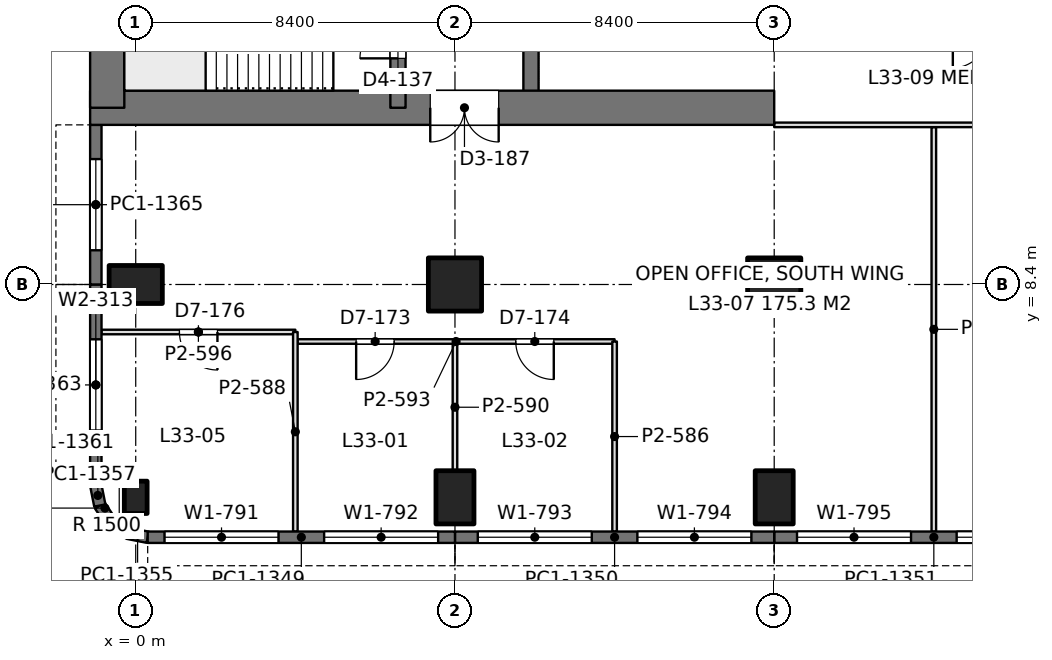
"""IFC4 building model, lengths in metres.
Left out: names, types, materials, properties, quantities, classifications, styles, units other than length and angle.
Written with IfcOpenShell. Run it as: python <this file> out.ifc"""

import sys

from ifc_helpers import new_model, si_unit, direction, frame, frame_2d, origin, origin_2d, place, context, subcontext, project, spatial, rectangle, extrude, element, fill, save


model = new_model("IFC4")
c1 = context("Model", 3, precision=1e-05, world=origin(), true_north=direction((0.0, 1.0)))
c2 = subcontext(c1, "Body", "Model", "MODEL_VIEW")
j1 = project(units=[si_unit("LENGTHUNIT", "METRE"), si_unit("PLANEANGLEUNIT", "RADIAN")], contexts=[c1])
p1 = place(None, origin())
s1 = spatial("IfcSite", under=j1, at=p1, CompositionType="ELEMENT")
p2 = place(p1, origin())
s2 = spatial("IfcBuilding", under=s1, at=p2, CompositionType="ELEMENT")
p3 = place(p2, frame((0.0, 0.0, 147.0)))
s3 = spatial("IfcBuildingStorey", under=s2, at=p3, CompositionType="ELEMENT", Elevation=147.0)
p4 = place(p3, frame((0.0, 2.8, 0.0), z_axis=(0.0, 0.0, 1.0), x_axis=(1.0, 0.0, 0.0)))
e1 = element("IfcColumn", 1, at=p4, inside=s3, PredefinedType="COLUMN", context=c2, shape_type="SweptSolid", body=[
    extrude(rectangle(XDim=0.6, YDim=0.85, at=origin_2d()), origin(), (0.0, 0.0, 1.0), 4.2),
])
for number, where, z_axis, x_axis in (
    (2, (0.0, 8.4, 0.0), (0.0, 0.0, 1.0), (0.0, 1.0, 0.0)),
    (3, (8.4, 2.8, 0.0), (0.0, 0.0, 1.0), (1.0, 0.0, 0.0)),
):
    element("IfcColumn", number, at=place(p3, frame(where, z_axis=z_axis, x_axis=x_axis)), inside=s3, PredefinedType="COLUMN", context=c2, shape_type="SweptSolid", body=[
        extrude(rectangle(XDim=1.0, YDim=1.4, at=origin_2d()), origin(), (0.0, 0.0, 1.0), 4.2),
    ])
p5 = place(p3, frame((8.4, 8.4, 0.0), z_axis=(0.0, 0.0, 1.0), x_axis=(1.0, 0.0, 0.0)))
e4 = element("IfcColumn", 4, at=p5, inside=s3, PredefinedType="COLUMN", context=c2, shape_type="SweptSolid", body=[
    extrude(rectangle(XDim=1.4, YDim=1.4, at=origin_2d()), origin(), (0.0, 0.0, 1.0), 4.2),
])
p6 = place(p3, frame((16.8, 2.8, 0.0), z_axis=(0.0, 0.0, 1.0), x_axis=(1.0, 0.0, 0.0)))
e5 = element("IfcColumn", 5, at=p6, inside=s3, PredefinedType="COLUMN", context=c2, shape_type="SweptSolid", body=[
    extrude(rectangle(XDim=1.0, YDim=1.4, at=origin_2d()), origin(), (0.0, 0.0, 1.0), 4.2),
])
p7 = place(p3, frame((16.8, 8.4, 0.0), z_axis=(0.0, 0.0, 1.0), x_axis=(1.0, 0.0, 0.0)))
e6 = element("IfcColumn", 6, at=p7, inside=s3, PredefinedType="COLUMN", context=c2, shape_type="SweptSolid", body=[
    extrude(rectangle(XDim=1.4, YDim=1.4, at=origin_2d()), origin(), (0.0, 0.0, 1.0), 4.2),
])
p8 = place(p3, frame((-1.2, 13.05, 0.0), z_axis=(0.0, 0.0, 1.0), x_axis=(1.0, 0.0, 0.0)))
e7 = element("IfcWall", 7, at=p8, inside=s3, PredefinedType="SHEAR", context=c2, shape_type="SweptSolid", body=[
    extrude(rectangle(XDim=18.0, YDim=0.9, at=frame_2d((9.0, 0.0))), origin(), (0.0, 0.0, 1.0), 4.2),
])
p9 = place(p8, frame((8.95, 0.0, 0.0)))
e8 = element("IfcOpeningElement", 8, at=p9, cuts=e7, PredefinedType="OPENING", context=c2, shape_type="SweptSolid", body=[
    extrude(rectangle(XDim=1.8, YDim=2.4, at=frame_2d((0.9, 1.2))), frame((0.0, 0.46, 0.0), z_axis=(0.0, -1.0, 0.0), x_axis=(1.0, 0.0, 0.0)), (0.0, 0.0, 1.0), 0.92),
])
p10 = place(p3, frame((-0.75, 13.05, 0.0), z_axis=(0.0, 0.0, 1.0), x_axis=(0.0, 1.0, 0.0)))
e9 = element("IfcWall", 9, at=p10, inside=s3, PredefinedType="SHEAR", context=c2, shape_type="SweptSolid", body=[
    extrude(rectangle(XDim=24.3, YDim=0.9, at=frame_2d((12.15, 0.0))), origin(), (0.0, 0.0, 1.0), 4.2),
])
p11 = place(p3, frame((6.9, 13.05, 0.0), z_axis=(0.0, 0.0, 1.0), x_axis=(0.0, 1.0, 0.0)))
e10 = element("IfcWall", 10, at=p11, inside=s3, PredefinedType="SHEAR", context=c2, shape_type="SweptSolid", body=[
    extrude(rectangle(XDim=24.3, YDim=0.4, at=frame_2d((12.15, 0.0))), origin(), (0.0, 0.0, 1.0), 4.2),
])
p12 = place(p11, frame((1.3, 0.0, 0.0)))
e11 = element("IfcOpeningElement", 11, at=p12, cuts=e10, PredefinedType="OPENING", context=c2, shape_type="SweptSolid", body=[
    extrude(rectangle(XDim=1.0, YDim=2.2, at=frame_2d((0.5, 1.1))), frame((0.0, 0.21, 0.0), z_axis=(0.0, -1.0, 0.0), x_axis=(1.0, 0.0, 0.0)), (0.0, 0.0, 1.0), 0.42),
])
p13 = place(p11, frame((22.0, 0.0, 0.0)))
e12 = element("IfcOpeningElement", 12, at=p13, cuts=e10, PredefinedType="OPENING", context=c2, shape_type="SweptSolid", body=[
    extrude(rectangle(XDim=1.0, YDim=2.2, at=frame_2d((0.5, 1.1))), frame((0.0, 0.21, 0.0), z_axis=(0.0, -1.0, 0.0), x_axis=(1.0, 0.0, 0.0)), (0.0, 0.0, 1.0), 0.42),
])
p14 = place(p11, frame((5.55, 0.0, 0.0)))
e13 = element("IfcOpeningElement", 13, at=p14, cuts=e10, PredefinedType="OPENING", context=c2, shape_type="SweptSolid", body=[
    extrude(rectangle(XDim=1.0, YDim=2.2, at=frame_2d((0.5, 1.1))), frame((0.0, 0.21, 0.0), z_axis=(0.0, -1.0, 0.0), x_axis=(1.0, 0.0, 0.0)), (0.0, 0.0, 1.0), 0.42),
])
p15 = place(p11, frame((9.55, 0.0, 0.0)))
e14 = element("IfcOpeningElement", 14, at=p15, cuts=e10, PredefinedType="OPENING", context=c2, shape_type="SweptSolid", body=[
    extrude(rectangle(XDim=1.0, YDim=2.2, at=frame_2d((0.5, 1.1))), frame((0.0, 0.21, 0.0), z_axis=(0.0, -1.0, 0.0), x_axis=(1.0, 0.0, 0.0)), (0.0, 0.0, 1.0), 0.42),
])
p16 = place(p11, frame((12.8, 0.0, 0.0)))
e15 = element("IfcOpeningElement", 15, at=p16, cuts=e10, PredefinedType="OPENING", context=c2, shape_type="SweptSolid", body=[
    extrude(rectangle(XDim=1.1, YDim=2.2, at=frame_2d((0.55, 1.1))), frame((0.0, 0.21, 0.0), z_axis=(0.0, -1.0, 0.0), x_axis=(1.0, 0.0, 0.0)), (0.0, 0.0, 1.0), 0.42),
])
p17 = place(p11, frame((15.538, 0.0, 0.0)))
e16 = element("IfcOpeningElement", 16, at=p17, cuts=e10, PredefinedType="OPENING", context=c2, shape_type="SweptSolid", body=[
    extrude(rectangle(XDim=1.1, YDim=2.2, at=frame_2d((0.55, 1.1))), frame((0.0, 0.21, 0.0), z_axis=(0.0, -1.0, 0.0), x_axis=(1.0, 0.0, 0.0)), (0.0, 0.0, 1.0), 0.42),
])
p18 = place(p11, frame((18.262, 0.0, 0.0)))
e17 = element("IfcOpeningElement", 17, at=p18, cuts=e10, PredefinedType="OPENING", context=c2, shape_type="SweptSolid", body=[
    extrude(rectangle(XDim=1.1, YDim=2.2, at=frame_2d((0.55, 1.1))), frame((0.0, 0.21, 0.0), z_axis=(0.0, -1.0, 0.0), x_axis=(1.0, 0.0, 0.0)), (0.0, 0.0, 1.0), 0.42),
])
p19 = place(p3, frame((10.4, 13.05, 0.0), z_axis=(0.0, 0.0, 1.0), x_axis=(0.0, 1.0, 0.0)))
e18 = element("IfcWall", 18, at=p19, inside=s3, PredefinedType="SHEAR", context=c2, shape_type="SweptSolid", body=[
    extrude(rectangle(XDim=24.3, YDim=0.4, at=frame_2d((12.15, 0.0))), origin(), (0.0, 0.0, 1.0), 4.2),
])
p20 = place(p19, frame((10.05, 0.0, 0.0)))
e19 = element("IfcOpeningElement", 19, at=p20, cuts=e18, PredefinedType="OPENING", context=c2, shape_type="SweptSolid", body=[
    extrude(rectangle(XDim=1.1, YDim=2.2, at=frame_2d((0.55, 1.1))), frame((0.0, 0.21, 0.0), z_axis=(0.0, -1.0, 0.0), x_axis=(1.0, 0.0, 0.0)), (0.0, 0.0, 1.0), 0.42),
])
p21 = place(p19, frame((12.9, 0.0, 0.0)))
e20 = element("IfcOpeningElement", 20, at=p21, cuts=e18, PredefinedType="OPENING", context=c2, shape_type="SweptSolid", body=[
    extrude(rectangle(XDim=1.1, YDim=2.2, at=frame_2d((0.55, 1.1))), frame((0.0, 0.21, 0.0), z_axis=(0.0, -1.0, 0.0), x_axis=(1.0, 0.0, 0.0)), (0.0, 0.0, 1.0), 0.42),
])
p22 = place(p19, frame((21.45, 0.0, 0.0)))
e21 = element("IfcOpeningElement", 21, at=p22, cuts=e18, PredefinedType="OPENING", context=c2, shape_type="SweptSolid", body=[
    extrude(rectangle(XDim=1.1, YDim=2.2, at=frame_2d((0.55, 1.1))), frame((0.0, 0.21, 0.0), z_axis=(0.0, -1.0, 0.0), x_axis=(1.0, 0.0, 0.0)), (0.0, 0.0, 1.0), 0.42),
])
p23 = place(p19, frame((2.25, 0.0, 0.0)))
e22 = element("IfcOpeningElement", 22, at=p23, cuts=e18, PredefinedType="OPENING", context=c2, shape_type="SweptSolid", body=[
    extrude(rectangle(XDim=1.8, YDim=2.4, at=frame_2d((0.9, 1.2))), frame((0.0, 0.21, 0.0), z_axis=(0.0, -1.0, 0.0), x_axis=(1.0, 0.0, 0.0)), (0.0, 0.0, 1.0), 0.42),
])
p24 = place(p19, frame((5.8, 0.0, 0.0)))
e23 = element("IfcOpeningElement", 23, at=p24, cuts=e18, PredefinedType="OPENING", context=c2, shape_type="SweptSolid", body=[
    extrude(rectangle(XDim=1.8, YDim=2.4, at=frame_2d((0.9, 1.2))), frame((0.0, 0.21, 0.0), z_axis=(0.0, -1.0, 0.0), x_axis=(1.0, 0.0, 0.0)), (0.0, 0.0, 1.0), 0.42),
])
p25 = place(p3, frame((25.2, 1.75, 0.0), z_axis=(0.0, 0.0, 1.0), x_axis=(-1.0, 0.0, 0.0)))
e24 = element("IfcWall", 24, at=p25, inside=s3, PredefinedType="SOLIDWALL", context=c2, shape_type="SweptSolid", body=[
    extrude(rectangle(XDim=8.4, YDim=0.3, at=frame_2d((4.2, 0.0))), origin(), (0.0, 0.0, 1.0), 4.05),
])
p26 = place(p25, frame((0.6, 0.0, 0.9)))
e25 = element("IfcOpeningElement", 25, at=p26, cuts=e24, PredefinedType="OPENING", context=c2, shape_type="SweptSolid", body=[
    extrude(rectangle(XDim=3.0, YDim=1.9, at=frame_2d((1.5, 0.95))), frame((0.0, 0.16, 0.0), z_axis=(0.0, -1.0, 0.0), x_axis=(1.0, 0.0, 0.0)), (0.0, 0.0, 1.0), 0.32),
])
p27 = place(p25, frame((4.8, 0.0, 0.9)))
e26 = element("IfcOpeningElement", 26, at=p27, cuts=e24, PredefinedType="OPENING", context=c2, shape_type="SweptSolid", body=[
    extrude(rectangle(XDim=3.0, YDim=1.9, at=frame_2d((1.5, 0.95))), frame((0.0, 0.16, 0.0), z_axis=(0.0, -1.0, 0.0), x_axis=(1.0, 0.0, 0.0)), (0.0, 0.0, 1.0), 0.32),
])
p28 = place(p3, frame((16.8, 1.75, 0.0), z_axis=(0.0, 0.0, 1.0), x_axis=(-1.0, 0.0, 0.0)))
e27 = element("IfcWall", 27, at=p28, inside=s3, PredefinedType="SOLIDWALL", context=c2, shape_type="SweptSolid", body=[
    extrude(rectangle(XDim=8.4, YDim=0.3, at=frame_2d((4.2, 0.0))), origin(), (0.0, 0.0, 1.0), 4.05),
])
p29 = place(p28, frame((0.6, 0.0, 0.9)))
e28 = element("IfcOpeningElement", 28, at=p29, cuts=e27, PredefinedType="OPENING", context=c2, shape_type="SweptSolid", body=[
    extrude(rectangle(XDim=3.0, YDim=1.9, at=frame_2d((1.5, 0.95))), frame((0.0, 0.16, 0.0), z_axis=(0.0, -1.0, 0.0), x_axis=(1.0, 0.0, 0.0)), (0.0, 0.0, 1.0), 0.32),
])
p30 = place(p28, frame((4.8, 0.0, 0.9)))
e29 = element("IfcOpeningElement", 29, at=p30, cuts=e27, PredefinedType="OPENING", context=c2, shape_type="SweptSolid", body=[
    extrude(rectangle(XDim=3.0, YDim=1.9, at=frame_2d((1.5, 0.95))), frame((0.0, 0.16, 0.0), z_axis=(0.0, -1.0, 0.0), x_axis=(1.0, 0.0, 0.0)), (0.0, 0.0, 1.0), 0.32),
])
p31 = place(p3, frame((8.4, 1.75, 0.0), z_axis=(0.0, 0.0, 1.0), x_axis=(-1.0, 0.0, 0.0)))
e30 = element("IfcWall", 30, at=p31, inside=s3, PredefinedType="SOLIDWALL", context=c2, shape_type="SweptSolid", body=[
    extrude(rectangle(XDim=8.085, YDim=0.3, at=frame_2d((4.042, 0.0))), origin(), (0.0, 0.0, 1.0), 4.05),
])
p32 = place(p31, frame((0.443, 0.0, 0.9)))
e31 = element("IfcOpeningElement", 31, at=p32, cuts=e30, PredefinedType="OPENING", context=c2, shape_type="SweptSolid", body=[
    extrude(rectangle(XDim=3.0, YDim=1.9, at=frame_2d((1.5, 0.95))), frame((0.0, 0.16, 0.0), z_axis=(0.0, -1.0, 0.0), x_axis=(1.0, 0.0, 0.0)), (0.0, 0.0, 1.0), 0.32),
])
p33 = place(p31, frame((4.643, 0.0, 0.9)))
e32 = element("IfcOpeningElement", 32, at=p33, cuts=e30, PredefinedType="OPENING", context=c2, shape_type="SweptSolid", body=[
    extrude(rectangle(XDim=3.0, YDim=1.9, at=frame_2d((1.5, 0.95))), frame((0.0, 0.16, 0.0), z_axis=(0.0, -1.0, 0.0), x_axis=(1.0, 0.0, 0.0)), (0.0, 0.0, 1.0), 0.32),
])
p34 = place(p3, frame((0.315, 1.75, 0.0), z_axis=(0.0, 0.0, 1.0), x_axis=(-0.980788534345, 0.195073962632, 0.0)))
e33 = element("IfcWall", 33, at=p34, inside=s3, PredefinedType="SOLIDWALL", context=c2, shape_type="SweptSolid", body=[
    extrude(rectangle(XDim=0.541, YDim=0.3, at=frame_2d((0.271, 0.0))), origin(), (0.0, 0.0, 1.0), 4.05),
])
for number, where, z_axis, x_axis in (
    (34, (-0.216, 1.855, 0.0), (0.0, 0.0, 1.0), (-0.831, 0.556, 0.0)),
    (35, (-0.653, 2.147, 0.0), (0.0, 0.0, 1.0), (-0.556, 0.831, 0.0)),
):
    element("IfcWall", number, at=place(p3, frame(where, z_axis=z_axis, x_axis=x_axis)), inside=s3, PredefinedType="SOLIDWALL", context=c2, shape_type="SweptSolid", body=[
        extrude(rectangle(XDim=0.526, YDim=0.3, at=frame_2d((0.263, 0.0))), origin(), (0.0, 0.0, 1.0), 4.05),
    ])
p35 = place(p3, frame((-0.945, 2.584, 0.0), z_axis=(0.0, 0.0, 1.0), x_axis=(-0.195073962632, 0.980788534345, 0.0)))
e36 = element("IfcWall", 36, at=p35, inside=s3, PredefinedType="SOLIDWALL", context=c2, shape_type="SweptSolid", body=[
    extrude(rectangle(XDim=0.541, YDim=0.3, at=frame_2d((0.271, 0.0))), origin(), (0.0, 0.0, 1.0), 4.05),
])
p36 = place(p3, frame((-1.05, 3.115, 0.0), z_axis=(0.0, 0.0, 1.0), x_axis=(0.0, 1.0, 0.0)))
e37 = element("IfcWall", 37, at=p36, inside=s3, PredefinedType="SOLIDWALL", context=c2, shape_type="SweptSolid", body=[
    extrude(rectangle(XDim=5.285, YDim=0.3, at=frame_2d((2.643, 0.0))), origin(), (0.0, 0.0, 1.0), 4.05),
])
p37 = place(p36, frame((1.443, 0.0, 0.9)))
e38 = element("IfcOpeningElement", 38, at=p37, cuts=e37, PredefinedType="OPENING", context=c2, shape_type="SweptSolid", body=[
    extrude(rectangle(XDim=2.4, YDim=1.9, at=frame_2d((1.2, 0.95))), frame((0.0, 0.16, 0.0), z_axis=(0.0, -1.0, 0.0), x_axis=(1.0, 0.0, 0.0)), (0.0, 0.0, 1.0), 0.32),
])
p38 = place(p3, frame((-1.05, 8.4, 0.0), z_axis=(0.0, 0.0, 1.0), x_axis=(0.0, 1.0, 0.0)))
e39 = element("IfcWall", 39, at=p38, inside=s3, PredefinedType="SOLIDWALL", context=c2, shape_type="SweptSolid", body=[
    extrude(rectangle(XDim=4.2, YDim=0.3, at=frame_2d((2.1, 0.0))), origin(), (0.0, 0.0, 1.0), 4.05),
])
p39 = place(p38, frame((0.9, 0.0, 0.9)))
e40 = element("IfcOpeningElement", 40, at=p39, cuts=e39, PredefinedType="OPENING", context=c2, shape_type="SweptSolid", body=[
    extrude(rectangle(XDim=2.4, YDim=1.9, at=frame_2d((1.2, 0.95))), frame((0.0, 0.16, 0.0), z_axis=(0.0, -1.0, 0.0), x_axis=(1.0, 0.0, 0.0)), (0.0, 0.0, 1.0), 0.32),
])
p40 = place(p3, frame((-0.902, 7.15, 0.0), z_axis=(0.0, 0.0, 1.0), x_axis=(1.0, 0.0, 0.0)))
e41 = element("IfcWall", 41, at=p40, inside=s3, PredefinedType="PARTITIONING", context=c2, shape_type="SweptSolid", body=[
    extrude(rectangle(XDim=5.102, YDim=0.12, at=frame_2d((2.551, 0.0))), origin(), (0.0, 0.0, 1.0), 3.56),
])
p41 = place(p40, frame((2.052, 0.0, 0.0)))
e42 = element("IfcOpeningElement", 42, at=p41, cuts=e41, PredefinedType="OPENING", context=c2, shape_type="SweptSolid", body=[
    extrude(rectangle(XDim=1.0, YDim=2.4, at=frame_2d((0.5, 1.2))), frame((0.0, 0.07, 0.0), z_axis=(0.0, -1.0, 0.0), x_axis=(1.0, 0.0, 0.0)), (0.0, 0.0, 1.0), 0.14),
])
p42 = place(p3, frame((4.258, 6.9, 0.0), z_axis=(0.0, 0.0, 1.0), x_axis=(1.0, 0.0, 0.0)))
e43 = element("IfcWall", 43, at=p42, inside=s3, PredefinedType="PARTITIONING", context=c2, shape_type="SweptSolid", body=[
    extrude(rectangle(XDim=8.342, YDim=0.12, at=frame_2d((4.171, 0.0))), origin(), (0.0, 0.0, 1.0), 3.55),
])
p43 = place(p42, frame((1.542, 0.0, 0.0)))
e44 = element("IfcOpeningElement", 44, at=p43, cuts=e43, PredefinedType="OPENING", context=c2, shape_type="SweptSolid", body=[
    extrude(rectangle(XDim=1.0, YDim=2.4, at=frame_2d((0.5, 1.2))), frame((0.0, 0.07, 0.0), z_axis=(0.0, -1.0, 0.0), x_axis=(1.0, 0.0, 0.0)), (0.0, 0.0, 1.0), 0.14),
])
p44 = place(p42, frame((5.742, 0.0, 0.0)))
e45 = element("IfcOpeningElement", 45, at=p44, cuts=e43, PredefinedType="OPENING", context=c2, shape_type="SweptSolid", body=[
    extrude(rectangle(XDim=1.0, YDim=2.4, at=frame_2d((0.5, 1.2))), frame((0.0, 0.07, 0.0), z_axis=(0.0, -1.0, 0.0), x_axis=(1.0, 0.0, 0.0)), (0.0, 0.0, 1.0), 0.14),
])
p45 = place(p3, frame((4.2, 1.898, 0.0), z_axis=(0.0, 0.0, 1.0), x_axis=(0.0, 1.0, 0.0)))
e46 = element("IfcWall", 46, at=p45, inside=s3, PredefinedType="PARTITIONING", context=c2, shape_type="SweptSolid", body=[
    extrude(rectangle(XDim=5.252, YDim=0.12, at=frame_2d((2.626, 0.0))), origin(), (0.0, 0.0, 1.0), 3.56),
])
p46 = place(p3, frame((8.4, 3.499, 0.0), z_axis=(0.0, 0.0, 1.0), x_axis=(0.0, 1.0, 0.0)))
e47 = element("IfcWall", 47, at=p46, inside=s3, PredefinedType="PARTITIONING", context=c2, shape_type="SweptSolid", body=[
    extrude(rectangle(XDim=3.343, YDim=0.12, at=frame_2d((1.671, 0.0))), origin(), (0.0, 0.0, 1.0), 3.55),
])
p47 = place(p3, frame((12.6, 1.898, 0.0), z_axis=(0.0, 0.0, 1.0), x_axis=(0.0, 1.0, 0.0)))
e48 = element("IfcWall", 48, at=p47, inside=s3, PredefinedType="PARTITIONING", context=c2, shape_type="SweptSolid", body=[
    extrude(rectangle(XDim=5.002, YDim=0.12, at=frame_2d((2.501, 0.0))), origin(), (0.0, 0.0, 1.0), 3.56),
])
p48 = place(p3, frame((21.0, 1.898, 0.0), z_axis=(0.0, 0.0, 1.0), x_axis=(0.0, 1.0, 0.0)))
e49 = element("IfcWall", 49, at=p48, inside=s3, PredefinedType="PARTITIONING", context=c2, shape_type="SweptSolid", body=[
    extrude(rectangle(XDim=10.644, YDim=0.12, at=frame_2d((5.322, 0.0))), origin(), (0.0, 0.0, 1.0), 3.55),
])
p49 = place(p3, frame((16.8, 12.6, 0.0), z_axis=(0.0, 0.0, 1.0), x_axis=(1.0, 0.0, 0.0)))
e50 = element("IfcWall", 50, at=p49, inside=s3, PredefinedType="PARTITIONING", context=c2, shape_type="SweptSolid", body=[
    extrude(rectangle(XDim=16.8, YDim=0.12, at=frame_2d((8.4, 0.0))), origin(), (0.0, 0.0, 1.0), 3.55),
])
p50 = place(p26, origin())
e51 = element("IfcWindow", 51, at=p50, inside=s3, PartitioningType="SINGLE_PANEL", PredefinedType="WINDOW", context=c2, shape_type="SweptSolid", body=[
    extrude(rectangle(XDim=3.0, YDim=1.9, at=frame_2d((1.5, 0.95))), frame((0.0, 0.03, 0.0), z_axis=(0.0, -1.0, 0.0), x_axis=(1.0, 0.0, 0.0)), (0.0, 0.0, 1.0), 0.06),
])
fill(e25, e51)
p51 = place(p27, origin())
e52 = element("IfcWindow", 52, at=p51, inside=s3, PartitioningType="SINGLE_PANEL", PredefinedType="WINDOW", context=c2, shape_type="SweptSolid", body=[
    extrude(rectangle(XDim=3.0, YDim=1.9, at=frame_2d((1.5, 0.95))), frame((0.0, 0.03, 0.0), z_axis=(0.0, -1.0, 0.0), x_axis=(1.0, 0.0, 0.0)), (0.0, 0.0, 1.0), 0.06),
])
fill(e26, e52)
p52 = place(p29, origin())
e53 = element("IfcWindow", 53, at=p52, inside=s3, PartitioningType="SINGLE_PANEL", PredefinedType="WINDOW", context=c2, shape_type="SweptSolid", body=[
    extrude(rectangle(XDim=3.0, YDim=1.9, at=frame_2d((1.5, 0.95))), frame((0.0, 0.03, 0.0), z_axis=(0.0, -1.0, 0.0), x_axis=(1.0, 0.0, 0.0)), (0.0, 0.0, 1.0), 0.06),
])
fill(e28, e53)
p53 = place(p30, origin())
e54 = element("IfcWindow", 54, at=p53, inside=s3, PartitioningType="SINGLE_PANEL", PredefinedType="WINDOW", context=c2, shape_type="SweptSolid", body=[
    extrude(rectangle(XDim=3.0, YDim=1.9, at=frame_2d((1.5, 0.95))), frame((0.0, 0.03, 0.0), z_axis=(0.0, -1.0, 0.0), x_axis=(1.0, 0.0, 0.0)), (0.0, 0.0, 1.0), 0.06),
])
fill(e29, e54)
p54 = place(p32, origin())
e55 = element("IfcWindow", 55, at=p54, inside=s3, PartitioningType="SINGLE_PANEL", PredefinedType="WINDOW", context=c2, shape_type="SweptSolid", body=[
    extrude(rectangle(XDim=3.0, YDim=1.9, at=frame_2d((1.5, 0.95))), frame((0.0, 0.03, 0.0), z_axis=(0.0, -1.0, 0.0), x_axis=(1.0, 0.0, 0.0)), (0.0, 0.0, 1.0), 0.06),
])
fill(e31, e55)
p55 = place(p33, origin())
e56 = element("IfcWindow", 56, at=p55, inside=s3, PartitioningType="SINGLE_PANEL", PredefinedType="WINDOW", context=c2, shape_type="SweptSolid", body=[
    extrude(rectangle(XDim=3.0, YDim=1.9, at=frame_2d((1.5, 0.95))), frame((0.0, 0.03, 0.0), z_axis=(0.0, -1.0, 0.0), x_axis=(1.0, 0.0, 0.0)), (0.0, 0.0, 1.0), 0.06),
])
fill(e32, e56)
p56 = place(p37, origin())
e57 = element("IfcWindow", 57, at=p56, inside=s3, PartitioningType="SINGLE_PANEL", PredefinedType="WINDOW", context=c2, shape_type="SweptSolid", body=[
    extrude(rectangle(XDim=2.4, YDim=1.9, at=frame_2d((1.2, 0.95))), frame((0.0, 0.03, 0.0), z_axis=(0.0, -1.0, 0.0), x_axis=(1.0, 0.0, 0.0)), (0.0, 0.0, 1.0), 0.06),
])
fill(e38, e57)
p57 = place(p39, origin())
e58 = element("IfcWindow", 58, at=p57, inside=s3, PartitioningType="SINGLE_PANEL", PredefinedType="WINDOW", context=c2, shape_type="SweptSolid", body=[
    extrude(rectangle(XDim=2.4, YDim=1.9, at=frame_2d((1.2, 0.95))), frame((0.0, 0.03, 0.0), z_axis=(0.0, -1.0, 0.0), x_axis=(1.0, 0.0, 0.0)), (0.0, 0.0, 1.0), 0.06),
])
fill(e40, e58)
p58 = place(p9, frame((1.8, 0.0, 0.0), z_axis=(0.0, 0.0, 1.0), x_axis=(-1.0, 0.0, 0.0)))
e59 = element("IfcDoor", 59, at=p58, inside=s3, OperationType="DOUBLE_DOOR_SINGLE_SWING", PredefinedType="DOOR", context=c2, shape_type="SweptSolid", body=[
    extrude(rectangle(XDim=1.8, YDim=2.4, at=frame_2d((0.9, 1.2))), frame((0.0, 0.025, 0.0), z_axis=(0.0, -1.0, 0.0), x_axis=(1.0, 0.0, 0.0)), (0.0, 0.0, 1.0), 0.05),
])
fill(e8, e59)
p59 = place(p12, origin())
e60 = element("IfcDoor", 60, at=p59, inside=s3, OperationType="SINGLE_SWING_LEFT", PredefinedType="DOOR", context=c2, shape_type="SweptSolid", body=[
    extrude(rectangle(XDim=1.0, YDim=2.2, at=frame_2d((0.5, 1.1))), frame((0.0, 0.025, 0.0), z_axis=(0.0, -1.0, 0.0), x_axis=(1.0, 0.0, 0.0)), (0.0, 0.0, 1.0), 0.05),
])
fill(e11, e60)
p60 = place(p41, frame((1.0, 0.0, 0.0), z_axis=(0.0, 0.0, 1.0), x_axis=(-1.0, 0.0, 0.0)))
e61 = element("IfcDoor", 61, at=p60, inside=s3, OperationType="SINGLE_SWING_LEFT", PredefinedType="DOOR", context=c2, shape_type="SweptSolid", body=[
    extrude(rectangle(XDim=1.0, YDim=2.4, at=frame_2d((0.5, 1.2))), frame((0.0, 0.025, 0.0), z_axis=(0.0, -1.0, 0.0), x_axis=(1.0, 0.0, 0.0)), (0.0, 0.0, 1.0), 0.05),
])
fill(e42, e61)
p61 = place(p43, frame((1.0, 0.0, 0.0), z_axis=(0.0, 0.0, 1.0), x_axis=(-1.0, 0.0, 0.0)))
e62 = element("IfcDoor", 62, at=p61, inside=s3, OperationType="SINGLE_SWING_RIGHT", PredefinedType="DOOR", context=c2, shape_type="SweptSolid", body=[
    extrude(rectangle(XDim=1.0, YDim=2.4, at=frame_2d((0.5, 1.2))), frame((0.0, 0.025, 0.0), z_axis=(0.0, -1.0, 0.0), x_axis=(1.0, 0.0, 0.0)), (0.0, 0.0, 1.0), 0.05),
])
fill(e44, e62)
p62 = place(p44, frame((1.0, 0.0, 0.0), z_axis=(0.0, 0.0, 1.0), x_axis=(-1.0, 0.0, 0.0)))
e63 = element("IfcDoor", 63, at=p62, inside=s3, OperationType="SINGLE_SWING_LEFT", PredefinedType="DOOR", context=c2, shape_type="SweptSolid", body=[
    extrude(rectangle(XDim=1.0, YDim=2.4, at=frame_2d((0.5, 1.2))), frame((0.0, 0.025, 0.0), z_axis=(0.0, -1.0, 0.0), x_axis=(1.0, 0.0, 0.0)), (0.0, 0.0, 1.0), 0.05),
])
fill(e45, e63)
save(model, sys.argv[1])
